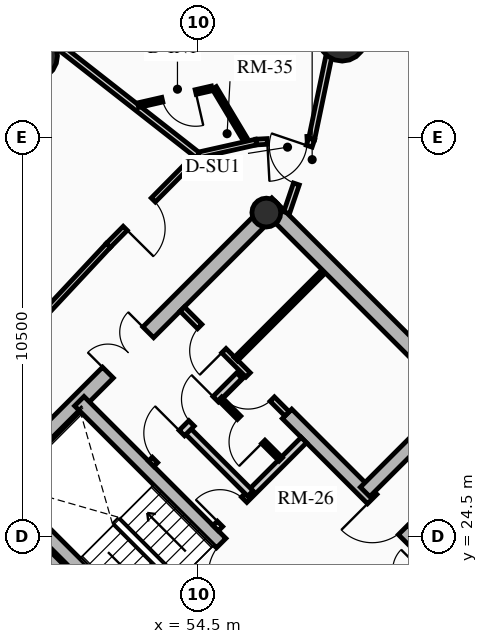
"""IFC4 building model, lengths in metres.
Left out: names, types, materials, properties, quantities, classifications, styles, units other than length and angle.
Written with IfcOpenShell. Run it as: python <this file> out.ifc"""

import sys

from ifc_helpers import new_model, si_unit, direction, frame, frame_2d, origin, origin_2d, place, context, subcontext, project, spatial, rectangle, circle, hollow_circle, extrude, source, transform, mapped, element, fill, save


model = new_model("IFC4")
c1 = context("Model", 3, precision=1e-05, world=origin(), true_north=direction((0.0, 1.0)))
c2 = subcontext(c1, "Body", "Model", "MODEL_VIEW")
j1 = project(units=[si_unit("LENGTHUNIT", "METRE"), si_unit("PLANEANGLEUNIT", "RADIAN")], contexts=[c1])
p1 = place(None, origin())
s1 = spatial("IfcSite", under=j1, at=p1, CompositionType="ELEMENT")
p2 = place(p1, origin())
s2 = spatial("IfcBuilding", under=s1, at=p2, CompositionType="ELEMENT")
p3 = place(p2, frame((0.0, 0.0, 183.61)))
s3 = spatial("IfcBuildingStorey", under=s2, at=p3, CompositionType="ELEMENT", Elevation=183.61)
for number, where, z_axis, x_axis in (
    (1, (58.702, 15.732, 0.0), (0.0, 0.0, 1.0), (-0.707, 0.707, 0.0)),
    (2, (66.268, 23.298, 0.0), (0.0, 0.0, 1.0), (-0.707, 0.707, 0.0)),
):
    element("IfcWall", number, at=place(p3, frame(where, z_axis=z_axis, x_axis=x_axis)), inside=s3, PredefinedType="SHEAR", context=c2, shape_type="SweptSolid", body=[
        extrude(rectangle(XDim=14.1, YDim=0.4, at=frame_2d((7.05, 0.0))), origin(), (0.0, 0.0, 1.0), 2.91),
    ])
p4 = place(p3, frame((48.873, 25.561, 0.0), z_axis=(0.0, 0.0, 1.0), x_axis=(0.707106781187, 0.707106781187, 0.0)))
e3 = element("IfcWall", 3, at=p4, inside=s3, PredefinedType="SHEAR", context=c2, shape_type="SweptSolid", body=[
    extrude(rectangle(XDim=10.7, YDim=0.4, at=frame_2d((5.35, 0.0))), origin(), (0.0, 0.0, 1.0), 2.91),
])
m1 = source(origin(), c2, "Body", "SweptSolid", [
    extrude(rectangle(XDim=1.5, YDim=2.02, at=frame_2d((0.75, 1.01))), frame((0.0, 0.21, 0.0), z_axis=(0.0, -1.0, 0.0), x_axis=(1.0, 0.0, 0.0)), (0.0, 0.0, 1.0), 0.42),
])
p5 = place(p4, frame((4.6, 0.0, 0.0)))
e4 = element("IfcOpeningElement", 4, at=p5, cuts=e3, PredefinedType="OPENING", context=c2, shape_type="MappedRepresentation", body=[
    mapped(m1, transform((0.0, 0.0, 0.0), x_axis=(1.0, 0.0, 0.0), y_axis=(0.0, 1.0, 0.0), z_axis=(0.0, 0.0, 1.0), scale=1.0)),
])
p6 = place(p3, frame((61.06, 18.373, 0.0), z_axis=(0.0, 0.0, 1.0), x_axis=(-0.707106781187, 0.707106781187, 0.0)))
e5 = element("IfcWall", 5, at=p6, inside=s3, PredefinedType="SHEAR", context=c2, shape_type="SweptSolid", body=[
    extrude(rectangle(XDim=13.7, YDim=0.35, at=frame_2d((6.85, 0.0))), origin(), (0.0, 0.0, 1.0), 2.91),
])
m2 = source(origin(), c2, "Body", "SweptSolid", [
    extrude(rectangle(XDim=1.1, YDim=2.015, at=frame_2d((0.55, 1.007))), frame((0.0, 0.185, 0.0), z_axis=(0.0, -1.0, 0.0), x_axis=(1.0, 0.0, 0.0)), (0.0, 0.0, 1.0), 0.37),
])
p7 = place(p6, frame((4.85, 0.0, 0.0)))
e6 = element("IfcOpeningElement", 6, at=p7, cuts=e5, PredefinedType="OPENING", context=c2, shape_type="MappedRepresentation", body=[
    mapped(m2, transform((0.0, 0.0, 0.0), x_axis=(1.0, 0.0, 0.0), y_axis=(0.0, 1.0, 0.0), z_axis=(0.0, 0.0, 1.0), scale=1.0)),
])
p8 = place(p6, frame((0.625, 0.0, 0.0)))
e7 = element("IfcOpeningElement", 7, at=p8, cuts=e5, PredefinedType="OPENING", context=c2, shape_type="MappedRepresentation", body=[
    mapped(m2, transform((0.0, 0.0, 0.0), x_axis=(1.0, 0.0, 0.0), y_axis=(0.0, 1.0, 0.0), z_axis=(0.0, 0.0, 1.0), scale=1.0)),
])
p9 = place(p6, frame((2.625, 0.0, 0.0)))
e8 = element("IfcOpeningElement", 8, at=p9, cuts=e5, PredefinedType="OPENING", context=c2, shape_type="MappedRepresentation", body=[
    mapped(m2, transform((0.0, 0.0, 0.0), x_axis=(1.0, 0.0, 0.0), y_axis=(0.0, 1.0, 0.0), z_axis=(0.0, 0.0, 1.0), scale=1.0)),
])
m3 = source(origin(), c2, "Body", "SweptSolid", [
    extrude(rectangle(XDim=1.15, YDim=2.02, at=frame_2d((0.575, 1.01))), frame((0.0, 0.185, 0.0), z_axis=(0.0, -1.0, 0.0), x_axis=(1.0, 0.0, 0.0)), (0.0, 0.0, 1.0), 0.37),
])
p10 = place(p6, frame((7.27, 0.0, 0.0)))
e9 = element("IfcOpeningElement", 9, at=p10, cuts=e5, PredefinedType="OPENING", context=c2, shape_type="MappedRepresentation", body=[
    mapped(m3, transform((0.0, 0.0, 0.0), x_axis=(1.0, 0.0, 0.0), y_axis=(0.0, 1.0, 0.0), z_axis=(0.0, 0.0, 1.0), scale=1.0)),
])
p11 = place(p3, frame((63.627, 20.94, 0.0), z_axis=(0.0, 0.0, 1.0), x_axis=(-0.707119496762, 0.707094065383, 0.0)))
e10 = element("IfcWall", 10, at=p11, inside=s3, PredefinedType="SHEAR", context=c2, shape_type="SweptSolid", body=[
    extrude(rectangle(XDim=9.6, YDim=0.35, at=frame_2d((4.8, 0.0))), origin(), (0.0, 0.0, 1.0), 2.91),
])
p12 = place(p11, frame((5.28, 0.0, 0.0)))
e11 = element("IfcOpeningElement", 11, at=p12, cuts=e10, PredefinedType="OPENING", context=c2, shape_type="MappedRepresentation", body=[
    mapped(m3, transform((0.0, 0.0, 0.0), x_axis=(1.0, 0.0, 0.0), y_axis=(0.0, 1.0, 0.0), z_axis=(0.0, 0.0, 1.0), scale=1.0)),
])
p13 = place(p3, frame((53.922, 21.141, 0.0), z_axis=(0.0, 0.0, 1.0), x_axis=(-0.707106781187, 0.707106781187, 0.0)))
e12 = element("IfcWall", 12, at=p13, inside=s3, PredefinedType="SHEAR", context=c2, shape_type="SweptSolid", body=[
    extrude(rectangle(XDim=6.695, YDim=0.35, at=frame_2d((3.348, 0.0))), origin(), (0.0, 0.0, 1.0), 2.91),
])
p14 = place(p3, frame((58.893, 25.674, 0.0), z_axis=(0.0, 0.0, 1.0), x_axis=(0.707106781187, 0.707106781187, 0.0)))
e13 = element("IfcWall", 13, at=p14, inside=s3, PredefinedType="SHEAR", context=c2, shape_type="SweptSolid", body=[
    extrude(rectangle(XDim=3.285, YDim=0.35, at=frame_2d((1.643, 0.0))), origin(), (0.0, 0.0, 1.0), 2.91),
])
p15 = place(p3, frame((56.294, 33.024, 0.0), z_axis=(0.0, 0.0, 1.0), x_axis=(0.707106781187, 0.707106781187, 0.0)))
e14 = element("IfcColumn", 14, at=p15, inside=s3, PredefinedType="COLUMN", context=c2, shape_type="SweptSolid", body=[
    extrude(hollow_circle(Radius=0.38, WallThickness=0.032, at=origin_2d()), origin(), (0.0, 0.0, 1.0), 2.91),
])
for number, where, z_axis, x_axis in (
    (15, (58.291, 37.635, 0.0), (0.0, 0.0, 1.0), (1.0, 0.0, 0.0)),
    (16, (50.173, 37.146, 0.0), (0.0, 0.0, 1.0), (1.0, 0.0, 0.0)),
):
    element("IfcColumn", number, at=place(p3, frame(where, z_axis=z_axis, x_axis=x_axis)), inside=s3, PredefinedType="USERDEFINED", context=c2, shape_type="SweptSolid", body=[
        extrude(circle(Radius=0.625, at=origin_2d()), origin(), (0.0, 0.0, 1.0), 2.91),
    ])
p16 = place(p3, frame((58.214, 21.467, 0.0), z_axis=(0.0, 0.0, 1.0), x_axis=(0.707106781187, 0.707106781187, 0.0)))
e17 = element("IfcWall", 17, at=p16, inside=s3, PredefinedType="PARTITIONING", context=c2, shape_type="SweptSolid", body=[
    extrude(rectangle(XDim=3.28, YDim=0.2, at=frame_2d((1.64, 0.0))), origin(), (0.0, 0.0, 1.0), 2.675),
])
m4 = source(origin(), c2, "Body", "SweptSolid", [
    extrude(rectangle(XDim=1.5, YDim=2.02, at=frame_2d((0.75, 1.01))), frame((0.0, 0.11, 0.0), z_axis=(0.0, -1.0, 0.0), x_axis=(1.0, 0.0, 0.0)), (0.0, 0.0, 1.0), 0.22),
])
p17 = place(p16, frame((1.55, 0.0, 0.0)))
e18 = element("IfcOpeningElement", 18, at=p17, cuts=e17, PredefinedType="OPENING", context=c2, shape_type="MappedRepresentation", body=[
    mapped(m4, transform((0.0, 0.0, 0.0), x_axis=(1.0, 0.0, 0.0), y_axis=(0.0, 1.0, 0.0), z_axis=(0.0, 0.0, 1.0), scale=1.0)),
])
p18 = place(p3, frame((54.961, 24.719, 0.0), z_axis=(0.0, 0.0, 1.0), x_axis=(0.707106781187, 0.707106781187, 0.0)))
e19 = element("IfcWall", 19, at=p18, inside=s3, PredefinedType="PARTITIONING", context=c2, shape_type="SweptSolid", body=[
    extrude(rectangle(XDim=3.28, YDim=0.2, at=frame_2d((1.64, 0.0))), origin(), (0.0, 0.0, 1.0), 2.675),
])
m5 = source(origin(), c2, "Body", "SweptSolid", [
    extrude(rectangle(XDim=0.9, YDim=2.005, at=frame_2d((0.45, 1.002))), frame((0.0, 0.11, 0.0), z_axis=(0.0, -1.0, 0.0), x_axis=(1.0, 0.0, 0.0)), (0.0, 0.0, 1.0), 0.22),
])
p19 = place(p18, frame((0.16, 0.0, 0.0)))
e20 = element("IfcOpeningElement", 20, at=p19, cuts=e19, PredefinedType="OPENING", context=c2, shape_type="MappedRepresentation", body=[
    mapped(m5, transform((0.0, 0.0, 0.0), x_axis=(1.0, 0.0, 0.0), y_axis=(0.0, 1.0, 0.0), z_axis=(0.0, 0.0, 1.0), scale=1.0)),
])
p20 = place(p3, frame((55.874, 25.631, 0.0), z_axis=(0.0, 0.0, 1.0), x_axis=(-0.707157639372, 0.707055919343, 0.0)))
e21 = element("IfcWall", 21, at=p20, inside=s3, PredefinedType="PARTITIONING", context=c2, shape_type="SweptSolid", body=[
    extrude(rectangle(XDim=2.4, YDim=0.2, at=frame_2d((1.2, 0.0))), origin(), (0.0, 0.0, 1.0), 2.675),
])
p21 = place(p3, frame((53.264, 26.416, 0.0), z_axis=(0.0, 0.0, 1.0), x_axis=(0.707106781187, 0.707106781187, 0.0)))
e22 = element("IfcWall", 22, at=p21, inside=s3, PredefinedType="PARTITIONING", context=c2, shape_type="SweptSolid", body=[
    extrude(rectangle(XDim=3.28, YDim=0.2, at=frame_2d((1.64, 0.0))), origin(), (0.0, 0.0, 1.0), 2.675),
])
m6 = source(origin(), c2, "Body", "SweptSolid", [
    extrude(rectangle(XDim=1.0, YDim=2.015, at=frame_2d((0.5, 1.007))), frame((0.0, 0.11, 0.0), z_axis=(0.0, -1.0, 0.0), x_axis=(1.0, 0.0, 0.0)), (0.0, 0.0, 1.0), 0.22),
])
p22 = place(p21, frame((0.14, 0.0, 0.0)))
e23 = element("IfcOpeningElement", 23, at=p22, cuts=e22, PredefinedType="OPENING", context=c2, shape_type="MappedRepresentation", body=[
    mapped(m6, transform((0.0, 0.0, 0.0), x_axis=(1.0, 0.0, 0.0), y_axis=(0.0, 1.0, 0.0), z_axis=(0.0, 0.0, 1.0), scale=1.0)),
])
p23 = place(p21, frame((1.5, 0.0, 0.0)))
e24 = element("IfcOpeningElement", 24, at=p23, cuts=e22, PredefinedType="OPENING", context=c2, shape_type="MappedRepresentation", body=[
    mapped(m5, transform((0.0, 0.0, 0.0), x_axis=(1.0, 0.0, 0.0), y_axis=(0.0, 1.0, 0.0), z_axis=(0.0, 0.0, 1.0), scale=1.0)),
])
p24 = place(p3, frame((56.673, 26.529, 0.0), z_axis=(0.0, 0.0, 1.0), x_axis=(-0.707052764397, 0.70716079385, 0.0)))
e25 = element("IfcWall", 25, at=p24, inside=s3, PredefinedType="PARTITIONING", context=c2, shape_type="SweptSolid", body=[
    extrude(rectangle(XDim=2.26, YDim=0.125, at=frame_2d((1.13, 0.0))), origin(), (0.0, 0.0, 1.0), 2.675),
])
m7 = source(origin(), c2, "Body", "SweptSolid", [
    extrude(rectangle(XDim=0.9, YDim=2.005, at=frame_2d((0.45, 1.002))), frame((0.0, 0.073, 0.0), z_axis=(0.0, -1.0, 0.0), x_axis=(1.0, 0.0, 0.0)), (0.0, 0.0, 1.0), 0.145),
])
p25 = place(p24, frame((0.65, 0.0, 0.0)))
e26 = element("IfcOpeningElement", 26, at=p25, cuts=e25, PredefinedType="OPENING", context=c2, shape_type="MappedRepresentation", body=[
    mapped(m7, transform((0.0, 0.0, 0.0), x_axis=(1.0, 0.0, 0.0), y_axis=(0.0, 1.0, 0.0), z_axis=(0.0, 0.0, 1.0), scale=1.0)),
])
p26 = place(p3, frame((56.839, 27.728, 0.0), z_axis=(0.0, 0.0, 1.0), x_axis=(-0.707106781187, 0.707106781187, 0.0)))
e27 = element("IfcWall", 27, at=p26, inside=s3, PredefinedType="PARTITIONING", context=c2, shape_type="SweptSolid", body=[
    extrude(rectangle(XDim=3.9, YDim=0.16, at=frame_2d((1.95, 0.0))), origin(), (0.0, 0.0, 1.0), 2.675),
])
m8 = source(origin(), c2, "Body", "SweptSolid", [
    extrude(rectangle(XDim=0.9, YDim=2.005, at=frame_2d((0.45, 1.002))), frame((0.0, 0.09, 0.0), z_axis=(0.0, -1.0, 0.0), x_axis=(1.0, 0.0, 0.0)), (0.0, 0.0, 1.0), 0.18),
])
p27 = place(p26, frame((0.55, 0.0, 0.0)))
e28 = element("IfcOpeningElement", 28, at=p27, cuts=e27, PredefinedType="OPENING", context=c2, shape_type="MappedRepresentation", body=[
    mapped(m8, transform((0.0, 0.0, 0.0), x_axis=(1.0, 0.0, 0.0), y_axis=(0.0, 1.0, 0.0), z_axis=(0.0, 0.0, 1.0), scale=1.0)),
])
p28 = place(p26, frame((2.35, 0.0, 0.0)))
e29 = element("IfcOpeningElement", 29, at=p28, cuts=e27, PredefinedType="OPENING", context=c2, shape_type="MappedRepresentation", body=[
    mapped(m8, transform((0.0, 0.0, 0.0), x_axis=(1.0, 0.0, 0.0), y_axis=(0.0, 1.0, 0.0), z_axis=(0.0, 0.0, 1.0), scale=1.0)),
])
p29 = place(p3, frame((55.492, 29.167, 0.0), z_axis=(0.0, 0.0, 1.0), x_axis=(0.707144688645, 0.707068871696, 0.0)))
e30 = element("IfcWall", 30, at=p29, inside=s3, PredefinedType="PARTITIONING", context=c2, shape_type="SweptSolid", body=[
    extrude(rectangle(XDim=3.22, YDim=0.125, at=frame_2d((1.61, 0.0))), origin(), (0.0, 0.0, 1.0), 2.212),
])
p30 = place(p3, frame((57.486, 34.96, 0.0), z_axis=(0.0, 0.0, 1.0), x_axis=(-0.998483871836, -0.055045051404, 0.0)))
e31 = element("IfcWall", 31, at=p30, inside=s3, PredefinedType="PARTITIONING", context=c2, shape_type="SweptSolid", body=[
    extrude(rectangle(XDim=1.464, YDim=0.15, at=frame_2d((0.732, 0.0))), origin(), (0.0, 0.0, 1.0), 2.245),
])
m9 = source(origin(), c2, "Body", "SweptSolid", [
    extrude(rectangle(XDim=1.05, YDim=2.015, at=frame_2d((0.525, 1.007))), frame((0.0, 0.085, 0.0), z_axis=(0.0, -1.0, 0.0), x_axis=(1.0, 0.0, 0.0)), (0.0, 0.0, 1.0), 0.17),
])
p31 = place(p30, frame((0.12, 0.0, 0.0)))
e32 = element("IfcOpeningElement", 32, at=p31, cuts=e31, PredefinedType="OPENING", context=c2, shape_type="MappedRepresentation", body=[
    mapped(m9, transform((0.0, 0.0, 0.0), x_axis=(1.0, 0.0, 0.0), y_axis=(0.0, 1.0, 0.0), z_axis=(0.0, 0.0, 1.0), scale=1.0)),
])
p32 = place(p3, frame((56.025, 34.88, 0.0), z_axis=(0.0, 0.0, 1.0), x_axis=(-0.975729093394, -0.218981132301, 0.0)))
e33 = element("IfcWall", 33, at=p32, inside=s3, PredefinedType="PARTITIONING", context=c2, shape_type="SweptSolid", body=[
    extrude(rectangle(XDim=1.575, YDim=0.15, at=frame_2d((0.788, 0.0))), origin(), (0.0, 0.0, 1.0), 2.245),
])
p33 = place(p3, frame((54.488, 34.535, 0.0), z_axis=(0.0, 0.0, 1.0), x_axis=(-0.703666289339, -0.710530613871, 0.0)))
e34 = element("IfcWall", 34, at=p33, inside=s3, PredefinedType="PARTITIONING", context=c2, shape_type="SweptSolid", body=[
    extrude(rectangle(XDim=3.343, YDim=0.15, at=frame_2d((1.672, 0.0))), origin(), (0.0, 0.0, 1.0), 2.245),
])
p34 = place(p33, frame((1.66, 0.0, 0.0)))
e35 = element("IfcOpeningElement", 35, at=p34, cuts=e34, PredefinedType="OPENING", context=c2, shape_type="MappedRepresentation", body=[
    mapped(m9, transform((0.0, 0.0, 0.0), x_axis=(1.0, 0.0, 0.0), y_axis=(0.0, 1.0, 0.0), z_axis=(0.0, 0.0, 1.0), scale=1.0)),
])
p35 = place(p3, frame((52.135, 32.159, 0.0), z_axis=(0.0, 0.0, 1.0), x_axis=(-0.682546302454, -0.730842353047, 0.0)))
e36 = element("IfcWall", 36, at=p35, inside=s3, PredefinedType="PARTITIONING", context=c2, shape_type="SweptSolid", body=[
    extrude(rectangle(XDim=6.445, YDim=0.15, at=frame_2d((3.223, 0.0))), origin(), (0.0, 0.0, 1.0), 2.245),
])
p36 = place(p3, frame((57.486, 34.96, 0.0), z_axis=(0.0, 0.0, 1.0), x_axis=(0.204011788318, 0.978968431681, 0.0)))
e37 = element("IfcWall", 37, at=p36, inside=s3, PredefinedType="PARTITIONING", context=c2, shape_type="SweptSolid", body=[
    extrude(rectangle(XDim=4.236, YDim=0.16, at=frame_2d((2.118, 0.0))), origin(), (0.0, 0.0, 1.0), 2.245),
])
p37 = place(p3, frame((54.488, 34.535, 0.0), z_axis=(0.0, 0.0, 1.0), x_axis=(-0.787155500995, 0.616754584298, 0.0)))
e38 = element("IfcWall", 38, at=p37, inside=s3, PredefinedType="PARTITIONING", context=c2, shape_type="SweptSolid", body=[
    extrude(rectangle(XDim=6.562, YDim=0.16, at=frame_2d((3.281, 0.0))), origin(), (0.0, 0.0, 1.0), 2.245),
])
p38 = place(p3, frame((56.828, 33.021, 0.0), z_axis=(0.0, 0.0, 1.0), x_axis=(0.321300161671, 0.94697740528, 0.0)))
e39 = element("IfcWall", 39, at=p38, inside=s3, PredefinedType="PARTITIONING", context=c2, shape_type="SweptSolid", body=[
    extrude(rectangle(XDim=2.049, YDim=0.16, at=frame_2d((1.024, 0.0))), origin(), (0.0, 0.0, 1.0), 2.245),
])
m10 = source(origin(), c2, "Body", "SweptSolid", [
    extrude(rectangle(XDim=1.05, YDim=2.015, at=frame_2d((0.525, 1.007))), frame((0.0, 0.09, 0.0), z_axis=(0.0, -1.0, 0.0), x_axis=(1.0, 0.0, 0.0)), (0.0, 0.0, 1.0), 0.18),
])
p39 = place(p38, frame((0.798, 0.0, 0.0)))
e40 = element("IfcOpeningElement", 40, at=p39, cuts=e39, PredefinedType="OPENING", context=c2, shape_type="MappedRepresentation", body=[
    mapped(m10, transform((0.0, 0.0, 0.0), x_axis=(1.0, 0.0, 0.0), y_axis=(0.0, 1.0, 0.0), z_axis=(0.0, 0.0, 1.0), scale=1.0)),
])
p40 = place(p3, frame((55.727, 34.97, 0.0), z_axis=(0.0, 0.0, 1.0), x_axis=(-0.514518774568, 0.857479113808, 0.0)))
e41 = element("IfcWall", 41, at=p40, inside=s3, PredefinedType="PARTITIONING", context=c2, shape_type="SweptSolid", body=[
    extrude(rectangle(XDim=1.56, YDim=0.125, at=frame_2d((0.78, 0.0))), origin(), (0.0, 0.0, 1.0), 2.245),
])
p41 = place(p3, frame((54.864, 36.293, 0.0), z_axis=(0.0, 0.0, 1.0), x_axis=(-0.974875983782, -0.222748324896, 0.0)))
e42 = element("IfcWall", 42, at=p41, inside=s3, PredefinedType="PARTITIONING", context=c2, shape_type="SweptSolid", body=[
    extrude(rectangle(XDim=1.994, YDim=0.125, at=frame_2d((0.997, 0.0))), origin(), (0.0, 0.0, 1.0), 2.675),
])
p42 = place(p41, frame((0.44, 0.0, 0.0)))
e43 = element("IfcOpeningElement", 43, at=p42, cuts=e42, PredefinedType="OPENING", context=c2, shape_type="MappedRepresentation", body=[
    mapped(m7, transform((0.0, 0.0, 0.0), x_axis=(1.0, 0.0, 0.0), y_axis=(0.0, 1.0, 0.0), z_axis=(0.0, 0.0, 1.0), scale=1.0)),
])
m11 = source(origin(), c2, "Body", "SweptSolid", [
    extrude(rectangle(XDim=1.15, YDim=2.02, at=frame_2d((0.575, 1.01))), frame((0.0, 0.025, 0.0), z_axis=(0.0, -1.0, 0.0), x_axis=(1.0, 0.0, 0.0)), (0.0, 0.0, 1.0), 0.05),
])
p43 = place(p10, origin())
e44 = element("IfcDoor", 44, at=p43, inside=s3, OperationType="SINGLE_SWING_LEFT", PredefinedType="DOOR", context=c2, shape_type="MappedRepresentation", body=[
    mapped(m11, transform((0.0, 0.0, 0.0), x_axis=(1.0, 0.0, 0.0), y_axis=(0.0, 1.0, 0.0), z_axis=(0.0, 0.0, 1.0), scale=1.0)),
])
fill(e9, e44)
p44 = place(p12, origin())
e45 = element("IfcDoor", 45, at=p44, inside=s3, OperationType="SINGLE_SWING_RIGHT", PredefinedType="DOOR", context=c2, shape_type="MappedRepresentation", body=[
    mapped(m11, transform((0.0, 0.0, 0.0), x_axis=(1.0, 0.0, 0.0), y_axis=(0.0, 1.0, 0.0), z_axis=(0.0, 0.0, 1.0), scale=1.0)),
])
fill(e11, e45)
m12 = source(origin(), c2, "Body", "SweptSolid", [
    extrude(rectangle(XDim=1.5, YDim=2.02, at=frame_2d((0.75, 1.01))), frame((0.0, 0.025, 0.0), z_axis=(0.0, -1.0, 0.0), x_axis=(1.0, 0.0, 0.0)), (0.0, 0.0, 1.0), 0.05),
])
p45 = place(p5, origin())
e46 = element("IfcDoor", 46, at=p45, inside=s3, OperationType="DOUBLE_DOOR_SINGLE_SWING", PredefinedType="DOOR", context=c2, shape_type="MappedRepresentation", body=[
    mapped(m12, transform((0.0, 0.0, 0.0), x_axis=(1.0, 0.0, 0.0), y_axis=(0.0, 1.0, 0.0), z_axis=(0.0, 0.0, 1.0), scale=1.0)),
])
fill(e4, e46)
m13 = source(origin(), c2, "Body", "SweptSolid", [
    extrude(rectangle(XDim=0.9, YDim=2.005, at=frame_2d((0.45, 1.002))), frame((0.0, 0.025, 0.0), z_axis=(0.0, -1.0, 0.0), x_axis=(1.0, 0.0, 0.0)), (0.0, 0.0, 1.0), 0.05),
])
p46 = place(p19, origin())
e47 = element("IfcDoor", 47, at=p46, inside=s3, OperationType="SINGLE_SWING_LEFT", PredefinedType="DOOR", context=c2, shape_type="MappedRepresentation", body=[
    mapped(m13, transform((0.0, 0.0, 0.0), x_axis=(1.0, 0.0, 0.0), y_axis=(0.0, 1.0, 0.0), z_axis=(0.0, 0.0, 1.0), scale=1.0)),
])
fill(e20, e47)
m14 = source(origin(), c2, "Body", "SweptSolid", [
    extrude(rectangle(XDim=1.0, YDim=2.015, at=frame_2d((0.5, 1.007))), frame((0.0, 0.025, 0.0), z_axis=(0.0, -1.0, 0.0), x_axis=(1.0, 0.0, 0.0)), (0.0, 0.0, 1.0), 0.05),
])
p47 = place(p22, origin())
e48 = element("IfcDoor", 48, at=p47, inside=s3, OperationType="SINGLE_SWING_RIGHT", PredefinedType="DOOR", context=c2, shape_type="MappedRepresentation", body=[
    mapped(m14, transform((0.0, 0.0, 0.0), x_axis=(1.0, 0.0, 0.0), y_axis=(0.0, 1.0, 0.0), z_axis=(0.0, 0.0, 1.0), scale=1.0)),
])
fill(e23, e48)
p48 = place(p23, origin())
e49 = element("IfcDoor", 49, at=p48, inside=s3, OperationType="SINGLE_SWING_RIGHT", PredefinedType="DOOR", context=c2, shape_type="MappedRepresentation", body=[
    mapped(m13, transform((0.0, 0.0, 0.0), x_axis=(1.0, 0.0, 0.0), y_axis=(0.0, 1.0, 0.0), z_axis=(0.0, 0.0, 1.0), scale=1.0)),
])
fill(e24, e49)
p49 = place(p25, origin())
e50 = element("IfcDoor", 50, at=p49, inside=s3, OperationType="SINGLE_SWING_LEFT", PredefinedType="DOOR", context=c2, shape_type="MappedRepresentation", body=[
    mapped(m13, transform((0.0, 0.0, 0.0), x_axis=(1.0, 0.0, 0.0), y_axis=(0.0, 1.0, 0.0), z_axis=(0.0, 0.0, 1.0), scale=1.0)),
])
fill(e26, e50)
p50 = place(p27, origin())
e51 = element("IfcDoor", 51, at=p50, inside=s3, OperationType="SINGLE_SWING_RIGHT", PredefinedType="DOOR", context=c2, shape_type="MappedRepresentation", body=[
    mapped(m13, transform((0.0, 0.0, 0.0), x_axis=(1.0, 0.0, 0.0), y_axis=(0.0, 1.0, 0.0), z_axis=(0.0, 0.0, 1.0), scale=1.0)),
])
fill(e28, e51)
p51 = place(p28, origin())
e52 = element("IfcDoor", 52, at=p51, inside=s3, OperationType="SINGLE_SWING_LEFT", PredefinedType="DOOR", context=c2, shape_type="MappedRepresentation", body=[
    mapped(m13, transform((0.0, 0.0, 0.0), x_axis=(1.0, 0.0, 0.0), y_axis=(0.0, 1.0, 0.0), z_axis=(0.0, 0.0, 1.0), scale=1.0)),
])
fill(e29, e52)
m15 = source(origin(), c2, "Body", "SweptSolid", [
    extrude(rectangle(XDim=1.05, YDim=2.015, at=frame_2d((0.525, 1.007))), frame((0.0, 0.025, 0.0), z_axis=(0.0, -1.0, 0.0), x_axis=(1.0, 0.0, 0.0)), (0.0, 0.0, 1.0), 0.05),
])
p52 = place(p39, origin())
e53 = element("IfcDoor", 53, at=p52, inside=s3, OperationType="SINGLE_SWING_RIGHT", PredefinedType="DOOR", context=c2, shape_type="MappedRepresentation", body=[
    mapped(m15, transform((0.0, 0.0, 0.0), x_axis=(1.0, 0.0, 0.0), y_axis=(0.0, 1.0, 0.0), z_axis=(0.0, 0.0, 1.0), scale=1.0)),
])
fill(e40, e53)
p53 = place(p31, origin())
e54 = element("IfcDoor", 54, at=p53, inside=s3, OperationType="SINGLE_SWING_RIGHT", PredefinedType="DOOR", context=c2, shape_type="MappedRepresentation", body=[
    mapped(m15, transform((0.0, 0.0, 0.0), x_axis=(1.0, 0.0, 0.0), y_axis=(0.0, 1.0, 0.0), z_axis=(0.0, 0.0, 1.0), scale=1.0)),
])
fill(e32, e54)
p54 = place(p42, origin())
e55 = element("IfcDoor", 55, at=p54, inside=s3, OperationType="SINGLE_SWING_LEFT", PredefinedType="DOOR", context=c2, shape_type="MappedRepresentation", body=[
    mapped(m13, transform((0.0, 0.0, 0.0), x_axis=(1.0, 0.0, 0.0), y_axis=(0.0, 1.0, 0.0), z_axis=(0.0, 0.0, 1.0), scale=1.0)),
])
fill(e43, e55)
p55 = place(p34, origin())
e56 = element("IfcDoor", 56, at=p55, inside=s3, OperationType="SINGLE_SWING_RIGHT", PredefinedType="DOOR", context=c2, shape_type="MappedRepresentation", body=[
    mapped(m15, transform((0.0, 0.0, 0.0), x_axis=(1.0, 0.0, 0.0), y_axis=(0.0, 1.0, 0.0), z_axis=(0.0, 0.0, 1.0), scale=1.0)),
])
fill(e35, e56)
save(model, sys.argv[1])
